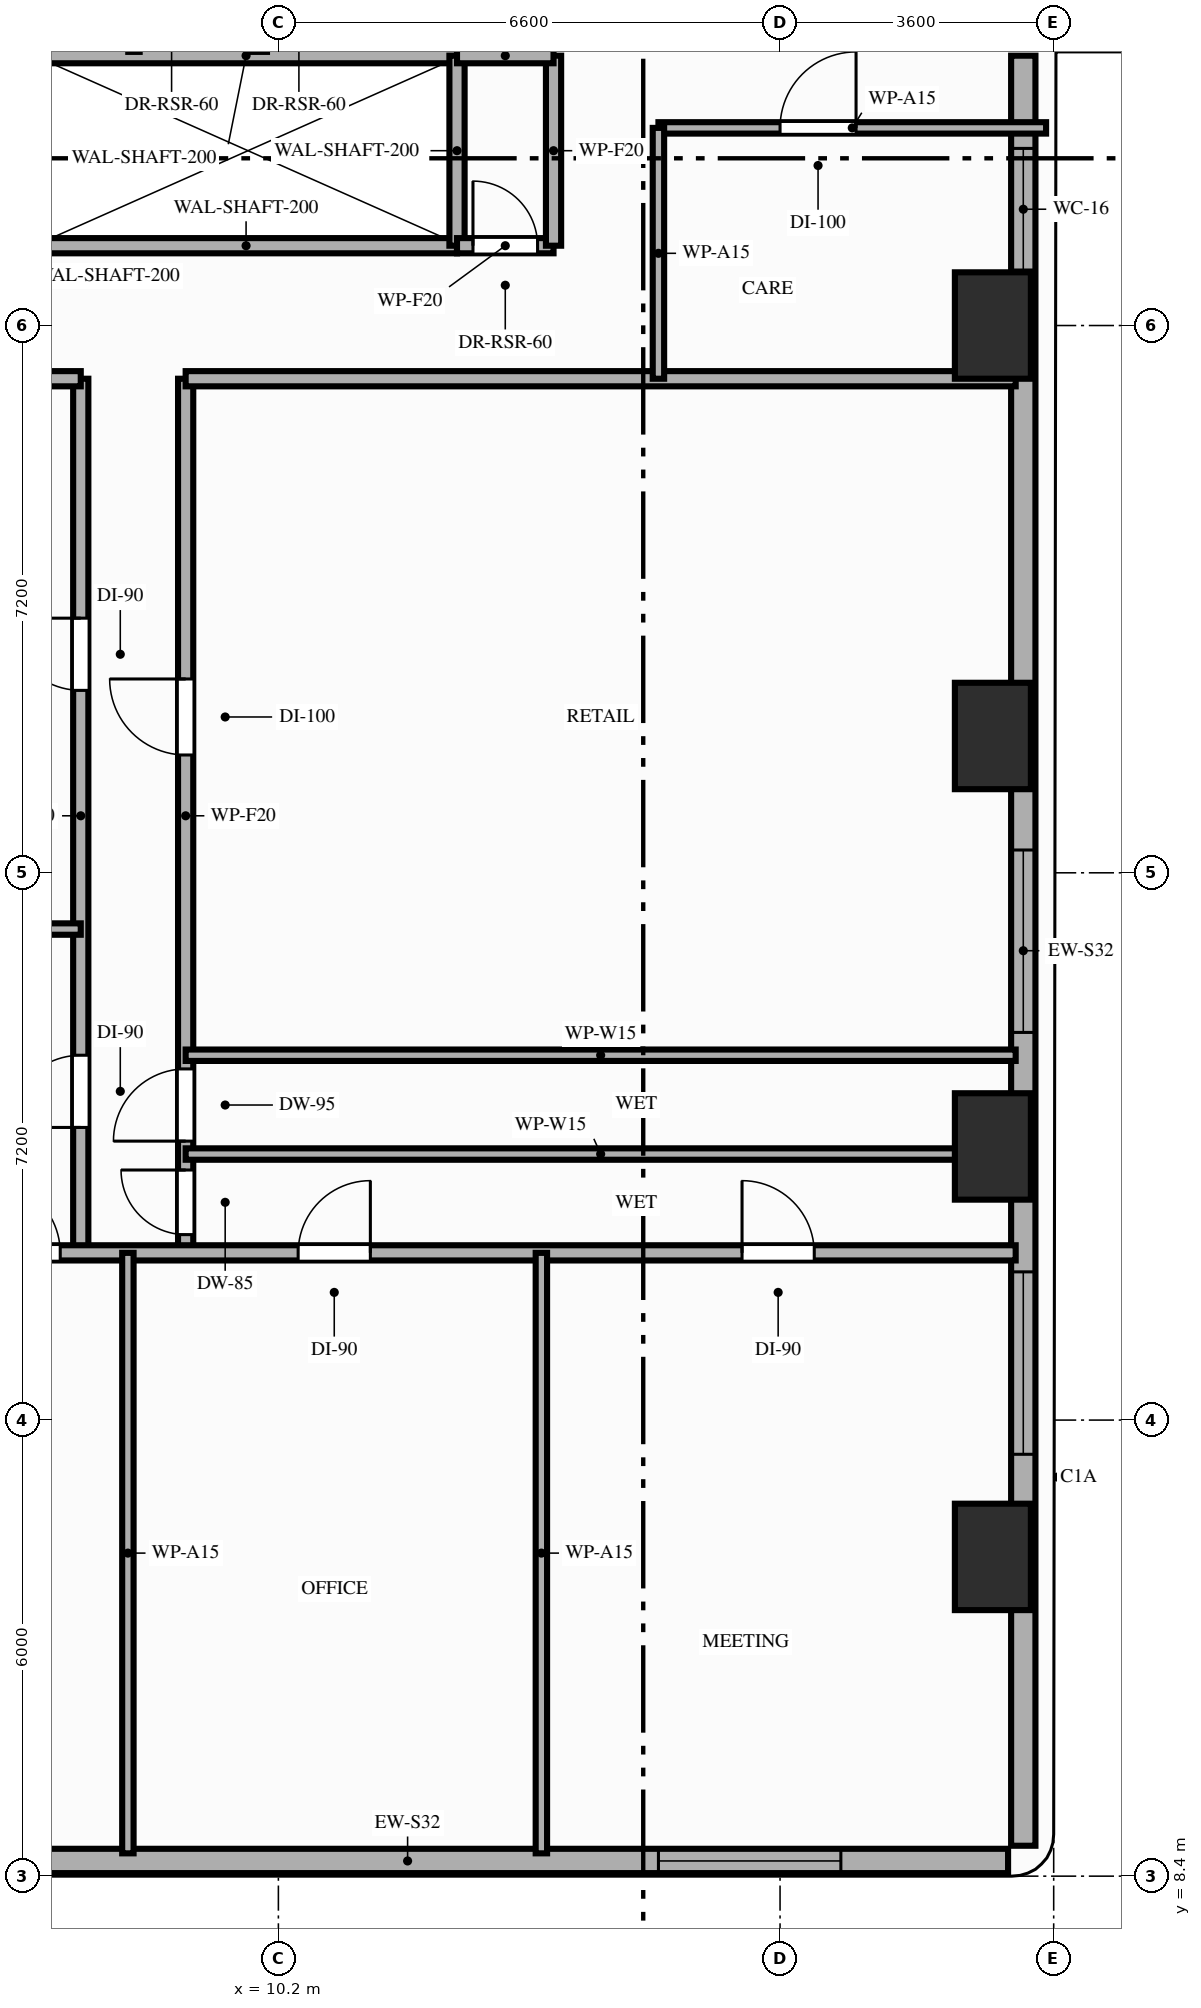
"""IFC4 building model, lengths in metres.
Left out: names, types, materials, properties, quantities, classifications, styles, units other than length and angle.
Written with IfcOpenShell. Run it as: python <this file> out.ifc"""

import sys

from ifc_helpers import new_model, si_unit, direction, frame, frame_2d, origin, origin_2d, place, context, subcontext, project, spatial, rectangle, extrude, element, fill, save


model = new_model("IFC4")
c1 = context("Model", 3, precision=1e-05, world=origin(), true_north=direction((0.0, 1.0)))
c2 = subcontext(c1, "Body", "Model", "MODEL_VIEW")
j1 = project(units=[si_unit("LENGTHUNIT", "METRE"), si_unit("PLANEANGLEUNIT", "RADIAN")], contexts=[c1])
p1 = place(None, origin())
s1 = spatial("IfcSite", under=j1, at=p1, CompositionType="ELEMENT")
p2 = place(p1, origin())
s2 = spatial("IfcBuilding", under=s1, at=p2, CompositionType="ELEMENT")
p3 = place(p2, frame((0.0, 0.0, 33.4)))
s3 = spatial("IfcBuildingStorey", under=s2, at=p3, CompositionType="ELEMENT", Elevation=33.4)
for number, where, z_axis, x_axis in (
    (1, (19.6, 12.6, 0.0), (0.0, 0.0, 1.0), (1.0, 0.0, 0.0)),
    (2, (19.6, 18.0, 0.0), (0.0, 0.0, 1.0), (1.0, 0.0, 0.0)),
    (3, (19.6, 23.4, 0.0), (0.0, 0.0, 1.0), (1.0, 0.0, 0.0)),
    (4, (19.6, 28.8, 0.0), (0.0, 0.0, 1.0), (1.0, 0.0, 0.0)),
):
    element("IfcColumn", number, at=place(p3, frame(where, z_axis=z_axis, x_axis=x_axis)), inside=s3, PredefinedType="COLUMN", context=c2, shape_type="SweptSolid", body=[
        extrude(rectangle(XDim=1.0, YDim=1.4, at=origin_2d()), origin(), (0.0, 0.0, 1.0), 3.2),
    ])
p4 = place(p3, frame((4.0, 8.6, 0.0), z_axis=(0.0, 0.0, 1.0), x_axis=(1.0, 0.0, 0.0)))
e5 = element("IfcWall", 5, at=p4, inside=s3, PredefinedType="STANDARD", context=c2, shape_type="SweptSolid", body=[
    extrude(rectangle(XDim=15.8, YDim=0.32, at=frame_2d((7.9, 0.0))), origin(), (0.0, 0.0, 1.0), 3.02),
])
p5 = place(p4, frame((11.2, 0.0, 0.85)))
e6 = element("IfcOpeningElement", 6, at=p5, cuts=e5, PredefinedType="OPENING", context=c2, shape_type="SweptSolid", body=[
    extrude(rectangle(XDim=2.4, YDim=1.8, at=frame_2d((1.2, 0.9))), frame((0.0, 0.17, 0.0), z_axis=(0.0, -1.0, 0.0), x_axis=(1.0, 0.0, 0.0)), (0.0, 0.0, 1.0), 0.34),
])
p6 = place(p3, frame((20.0, 8.8, 0.0), z_axis=(0.0, 0.0, 1.0), x_axis=(0.0, 1.0, 0.0)))
e7 = element("IfcWall", 7, at=p6, inside=s3, PredefinedType="STANDARD", context=c2, shape_type="SweptSolid", body=[
    extrude(rectangle(XDim=23.55, YDim=0.32, at=frame_2d((11.775, 0.0))), origin(), (0.0, 0.0, 1.0), 2.4),
])
p7 = place(p6, frame((20.73, 0.0, 0.85)))
e8 = element("IfcOpeningElement", 8, at=p7, cuts=e7, PredefinedType="OPENING", context=c2, shape_type="SweptSolid", body=[
    extrude(rectangle(XDim=1.6, YDim=1.3, at=frame_2d((0.8, 0.65))), frame((0.0, 0.17, 0.0), z_axis=(0.0, -1.0, 0.0), x_axis=(1.0, 0.0, 0.0)), (0.0, 0.0, 1.0), 0.34),
])
p8 = place(p6, frame((5.15, 0.0, 0.85)))
e9 = element("IfcOpeningElement", 9, at=p8, cuts=e7, PredefinedType="OPENING", context=c2, shape_type="SweptSolid", body=[
    extrude(rectangle(XDim=2.4, YDim=1.3, at=frame_2d((1.2, 0.65))), frame((0.0, 0.17, 0.0), z_axis=(0.0, -1.0, 0.0), x_axis=(1.0, 0.0, 0.0)), (0.0, 0.0, 1.0), 0.34),
])
p9 = place(p6, frame((10.7, 0.0, 0.85)))
e10 = element("IfcOpeningElement", 10, at=p9, cuts=e7, PredefinedType="OPENING", context=c2, shape_type="SweptSolid", body=[
    extrude(rectangle(XDim=2.4, YDim=1.3, at=frame_2d((1.2, 0.65))), frame((0.0, 0.17, 0.0), z_axis=(0.0, -1.0, 0.0), x_axis=(1.0, 0.0, 0.0)), (0.0, 0.0, 1.0), 0.34),
])
for number, where, z_axis, x_axis in (
    (11, (7.0, 29.85, 0.0), (0.0, 0.0, 1.0), (1.0, 0.0, 0.0)),
    (12, (7.0, 32.35, 0.0), (0.0, 0.0, 1.0), (1.0, 0.0, 0.0)),
):
    element("IfcWall", number, at=place(p3, frame(where, z_axis=z_axis, x_axis=x_axis)), inside=s3, PredefinedType="MOVABLE", context=c2, shape_type="SweptSolid", body=[
        extrude(rectangle(XDim=5.55, YDim=0.2, at=frame_2d((2.775, 0.0))), origin(), (0.0, 0.0, 1.0), 3.02),
    ])
p10 = place(p3, frame((12.55, 29.85, 0.0), z_axis=(0.0, 0.0, 1.0), x_axis=(0.0, 1.0, 0.0)))
e13 = element("IfcWall", 13, at=p10, inside=s3, PredefinedType="MOVABLE", context=c2, shape_type="SweptSolid", body=[
    extrude(rectangle(XDim=2.5, YDim=0.2, at=frame_2d((1.25, 0.0))), origin(), (0.0, 0.0, 1.0), 3.02),
])
p11 = place(p3, frame((12.55, 29.85, 0.0), z_axis=(0.0, 0.0, 1.0), x_axis=(1.0, 0.0, 0.0)))
e14 = element("IfcWall", 14, at=p11, inside=s3, PredefinedType="PARTITIONING", context=c2, shape_type="SweptSolid", body=[
    extrude(rectangle(XDim=1.27, YDim=0.2, at=frame_2d((0.635, 0.0))), origin(), (0.0, 0.0, 1.0), 3.02),
])
p12 = place(p11, frame((0.21, 0.0, 0.0)))
e15 = element("IfcOpeningElement", 15, at=p12, cuts=e14, PredefinedType="OPENING", context=c2, shape_type="SweptSolid", body=[
    extrude(rectangle(XDim=0.85, YDim=2.05, at=frame_2d((0.425, 1.025))), frame((0.0, 0.11, 0.0), z_axis=(0.0, -1.0, 0.0), x_axis=(1.0, 0.0, 0.0)), (0.0, 0.0, 1.0), 0.22),
])
p13 = place(p3, frame((13.82, 29.85, 0.0), z_axis=(0.0, 0.0, 1.0), x_axis=(0.0, 1.0, 0.0)))
e16 = element("IfcWall", 16, at=p13, inside=s3, PredefinedType="PARTITIONING", context=c2, shape_type="SweptSolid", body=[
    extrude(rectangle(XDim=2.5, YDim=0.2, at=frame_2d((1.25, 0.0))), origin(), (0.0, 0.0, 1.0), 3.02),
])
p14 = place(p3, frame((12.55, 32.35, 0.0), z_axis=(0.0, 0.0, 1.0), x_axis=(1.0, 0.0, 0.0)))
e17 = element("IfcWall", 17, at=p14, inside=s3, PredefinedType="PARTITIONING", context=c2, shape_type="SweptSolid", body=[
    extrude(rectangle(XDim=1.27, YDim=0.2, at=frame_2d((0.635, 0.0))), origin(), (0.0, 0.0, 1.0), 3.02),
])
p15 = place(p3, frame((7.6, 16.6, 0.0), z_axis=(0.0, 0.0, 1.0), x_axis=(0.0, 1.0, 0.0)))
e18 = element("IfcWall", 18, at=p15, inside=s3, PredefinedType="PARTITIONING", context=c2, shape_type="SweptSolid", body=[
    extrude(rectangle(XDim=11.5, YDim=0.2, at=frame_2d((5.75, 0.0))), origin(), (0.0, 0.0, 1.0), 2.4),
])
p16 = place(p15, frame((1.65, 0.0, 0.0)))
e19 = element("IfcOpeningElement", 19, at=p16, cuts=e18, PredefinedType="OPENING", context=c2, shape_type="SweptSolid", body=[
    extrude(rectangle(XDim=0.95, YDim=2.15, at=frame_2d((0.475, 1.075))), frame((0.0, 0.11, 0.0), z_axis=(0.0, -1.0, 0.0), x_axis=(1.0, 0.0, 0.0)), (0.0, 0.0, 1.0), 0.22),
])
p17 = place(p15, frame((7.4, 0.0, 0.0)))
e20 = element("IfcOpeningElement", 20, at=p17, cuts=e18, PredefinedType="OPENING", context=c2, shape_type="SweptSolid", body=[
    extrude(rectangle(XDim=0.95, YDim=2.15, at=frame_2d((0.475, 1.075))), frame((0.0, 0.11, 0.0), z_axis=(0.0, -1.0, 0.0), x_axis=(1.0, 0.0, 0.0)), (0.0, 0.0, 1.0), 0.22),
])
p18 = place(p3, frame((8.98, 16.6, 0.0), z_axis=(0.0, 0.0, 1.0), x_axis=(0.0, 1.0, 0.0)))
e21 = element("IfcWall", 21, at=p18, inside=s3, PredefinedType="PARTITIONING", context=c2, shape_type="SweptSolid", body=[
    extrude(rectangle(XDim=11.5, YDim=0.2, at=frame_2d((5.75, 0.0))), origin(), (0.0, 0.0, 1.0), 2.4),
])
p19 = place(p18, frame((0.24, 0.0, 0.0)))
e22 = element("IfcOpeningElement", 22, at=p19, cuts=e21, PredefinedType="OPENING", context=c2, shape_type="SweptSolid", body=[
    extrude(rectangle(XDim=0.85, YDim=2.1, at=frame_2d((0.425, 1.05))), frame((0.0, 0.11, 0.0), z_axis=(0.0, -1.0, 0.0), x_axis=(1.0, 0.0, 0.0)), (0.0, 0.0, 1.0), 0.22),
])
p20 = place(p18, frame((1.47, 0.0, 0.0)))
e23 = element("IfcOpeningElement", 23, at=p20, cuts=e21, PredefinedType="OPENING", context=c2, shape_type="SweptSolid", body=[
    extrude(rectangle(XDim=0.95, YDim=2.1, at=frame_2d((0.475, 1.05))), frame((0.0, 0.11, 0.0), z_axis=(0.0, -1.0, 0.0), x_axis=(1.0, 0.0, 0.0)), (0.0, 0.0, 1.0), 0.22),
])
p21 = place(p18, frame((6.55, 0.0, 0.0)))
e24 = element("IfcOpeningElement", 24, at=p21, cuts=e21, PredefinedType="OPENING", context=c2, shape_type="SweptSolid", body=[
    extrude(rectangle(XDim=1.0, YDim=2.15, at=frame_2d((0.5, 1.075))), frame((0.0, 0.11, 0.0), z_axis=(0.0, -1.0, 0.0), x_axis=(1.0, 0.0, 0.0)), (0.0, 0.0, 1.0), 0.22),
])
p22 = place(p3, frame((3.9, 16.6, 0.0), z_axis=(0.0, 0.0, 1.0), x_axis=(1.0, 0.0, 0.0)))
e25 = element("IfcWall", 25, at=p22, inside=s3, PredefinedType="PARTITIONING", context=c2, shape_type="SweptSolid", body=[
    extrude(rectangle(XDim=16.0, YDim=0.2, at=frame_2d((8.0, 0.0))), origin(), (0.0, 0.0, 1.0), 2.4),
])
p23 = place(p22, frame((2.48, 0.0, 0.0)))
e26 = element("IfcOpeningElement", 26, at=p23, cuts=e25, PredefinedType="OPENING", context=c2, shape_type="SweptSolid", body=[
    extrude(rectangle(XDim=0.95, YDim=2.15, at=frame_2d((0.475, 1.075))), frame((0.0, 0.11, 0.0), z_axis=(0.0, -1.0, 0.0), x_axis=(1.0, 0.0, 0.0)), (0.0, 0.0, 1.0), 0.22),
])
p24 = place(p22, frame((6.56, 0.0, 0.0)))
e27 = element("IfcOpeningElement", 27, at=p24, cuts=e25, PredefinedType="OPENING", context=c2, shape_type="SweptSolid", body=[
    extrude(rectangle(XDim=0.95, YDim=2.15, at=frame_2d((0.475, 1.075))), frame((0.0, 0.11, 0.0), z_axis=(0.0, -1.0, 0.0), x_axis=(1.0, 0.0, 0.0)), (0.0, 0.0, 1.0), 0.22),
])
p25 = place(p22, frame((12.4, 0.0, 0.0)))
e28 = element("IfcOpeningElement", 28, at=p25, cuts=e25, PredefinedType="OPENING", context=c2, shape_type="SweptSolid", body=[
    extrude(rectangle(XDim=0.95, YDim=2.15, at=frame_2d((0.475, 1.075))), frame((0.0, 0.11, 0.0), z_axis=(0.0, -1.0, 0.0), x_axis=(1.0, 0.0, 0.0)), (0.0, 0.0, 1.0), 0.22),
])
p26 = place(p3, frame((6.0, 28.1, 0.0), z_axis=(0.0, 0.0, 1.0), x_axis=(1.0, 0.0, 0.0)))
e29 = element("IfcWall", 29, at=p26, inside=s3, PredefinedType="PARTITIONING", context=c2, shape_type="SweptSolid", body=[
    extrude(rectangle(XDim=1.6, YDim=0.2, at=frame_2d((0.8, 0.0))), origin(), (0.0, 0.0, 1.0), 3.02),
])
p27 = place(p3, frame((8.98, 28.1, 0.0), z_axis=(0.0, 0.0, 1.0), x_axis=(1.0, 0.0, 0.0)))
e30 = element("IfcWall", 30, at=p27, inside=s3, PredefinedType="PARTITIONING", context=c2, shape_type="SweptSolid", body=[
    extrude(rectangle(XDim=10.92, YDim=0.2, at=frame_2d((5.46, 0.0))), origin(), (0.0, 0.0, 1.0), 2.4),
])
p28 = place(p3, frame((15.2, 31.4, 0.0), z_axis=(0.0, 0.0, 1.0), x_axis=(1.0, 0.0, 0.0)))
e31 = element("IfcWall", 31, at=p28, inside=s3, PredefinedType="PARTITIONING", context=c2, shape_type="SweptSolid", body=[
    extrude(rectangle(XDim=5.1, YDim=0.15, at=frame_2d((2.55, 0.0))), origin(), (0.0, 0.0, 1.0), 2.4),
])
p29 = place(p28, frame((1.6, 0.0, 0.0)))
e32 = element("IfcOpeningElement", 32, at=p29, cuts=e31, PredefinedType="OPENING", context=c2, shape_type="SweptSolid", body=[
    extrude(rectangle(XDim=1.0, YDim=2.15, at=frame_2d((0.5, 1.075))), frame((0.0, 0.085, 0.0), z_axis=(0.0, -1.0, 0.0), x_axis=(1.0, 0.0, 0.0)), (0.0, 0.0, 1.0), 0.17),
])
p30 = place(p3, frame((15.2, 28.1, 0.0), z_axis=(0.0, 0.0, 1.0), x_axis=(0.0, 1.0, 0.0)))
e33 = element("IfcWall", 33, at=p30, inside=s3, PredefinedType="PARTITIONING", context=c2, shape_type="SweptSolid", body=[
    extrude(rectangle(XDim=3.3, YDim=0.15, at=frame_2d((1.65, 0.0))), origin(), (0.0, 0.0, 1.0), 2.4),
])
p31 = place(p3, frame((3.9, 20.86, 0.0), z_axis=(0.0, 0.0, 1.0), x_axis=(1.0, 0.0, 0.0)))
e34 = element("IfcWall", 34, at=p31, inside=s3, PredefinedType="PARTITIONING", context=c2, shape_type="SweptSolid", body=[
    extrude(rectangle(XDim=3.7, YDim=0.15, at=frame_2d((1.85, 0.0))), origin(), (0.0, 0.0, 1.0), 2.4),
])
for number, where, z_axis, x_axis in (
    (35, (8.22, 8.7, 0.0), (0.0, 0.0, 1.0), (0.0, 1.0, 0.0)),
    (36, (13.66, 8.7, 0.0), (0.0, 0.0, 1.0), (0.0, 1.0, 0.0)),
):
    element("IfcWall", number, at=place(p3, frame(where, z_axis=z_axis, x_axis=x_axis)), inside=s3, PredefinedType="PARTITIONING", context=c2, shape_type="SweptSolid", body=[
        extrude(rectangle(XDim=7.9, YDim=0.15, at=frame_2d((3.95, 0.0))), origin(), (0.0, 0.0, 1.0), 2.4),
    ])
for number, where, z_axis, x_axis in (
    (37, (8.98, 17.9, 0.0), (0.0, 0.0, 1.0), (1.0, 0.0, 0.0)),
    (38, (8.98, 19.2, 0.0), (0.0, 0.0, 1.0), (1.0, 0.0, 0.0)),
):
    element("IfcWall", number, at=place(p3, frame(where, z_axis=z_axis, x_axis=x_axis)), inside=s3, PredefinedType="PARTITIONING", context=c2, shape_type="SweptSolid", body=[
        extrude(rectangle(XDim=10.92, YDim=0.15, at=frame_2d((5.46, 0.0))), origin(), (0.0, 0.0, 1.0), 2.4),
    ])
p32 = place(p7, origin())
e39 = element("IfcWindow", 39, at=p32, inside=s3, PartitioningType="SINGLE_PANEL", PredefinedType="WINDOW", context=c2, shape_type="SweptSolid", body=[
    extrude(rectangle(XDim=1.6, YDim=1.3, at=frame_2d((0.8, 0.65))), frame((0.0, 0.03, 0.0), z_axis=(0.0, -1.0, 0.0), x_axis=(1.0, 0.0, 0.0)), (0.0, 0.0, 1.0), 0.06),
])
fill(e8, e39)
p33 = place(p8, origin())
e40 = element("IfcWindow", 40, at=p33, inside=s3, PartitioningType="SINGLE_PANEL", PredefinedType="WINDOW", context=c2, shape_type="SweptSolid", body=[
    extrude(rectangle(XDim=2.4, YDim=1.3, at=frame_2d((1.2, 0.65))), frame((0.0, 0.03, 0.0), z_axis=(0.0, -1.0, 0.0), x_axis=(1.0, 0.0, 0.0)), (0.0, 0.0, 1.0), 0.06),
])
fill(e9, e40)
p34 = place(p9, origin())
e41 = element("IfcWindow", 41, at=p34, inside=s3, PartitioningType="SINGLE_PANEL", PredefinedType="WINDOW", context=c2, shape_type="SweptSolid", body=[
    extrude(rectangle(XDim=2.4, YDim=1.3, at=frame_2d((1.2, 0.65))), frame((0.0, 0.03, 0.0), z_axis=(0.0, -1.0, 0.0), x_axis=(1.0, 0.0, 0.0)), (0.0, 0.0, 1.0), 0.06),
])
fill(e10, e41)
p35 = place(p5, origin())
e42 = element("IfcWindow", 42, at=p35, inside=s3, PartitioningType="SINGLE_PANEL", PredefinedType="WINDOW", context=c2, shape_type="SweptSolid", body=[
    extrude(rectangle(XDim=2.4, YDim=1.8, at=frame_2d((1.2, 0.9))), frame((0.0, 0.03, 0.0), z_axis=(0.0, -1.0, 0.0), x_axis=(1.0, 0.0, 0.0)), (0.0, 0.0, 1.0), 0.06),
])
fill(e6, e42)
p36 = place(p12, origin())
e43 = element("IfcDoor", 43, at=p36, inside=s3, OperationType="SINGLE_SWING_LEFT", PredefinedType="DOOR", context=c2, shape_type="SweptSolid", body=[
    extrude(rectangle(XDim=0.85, YDim=2.05, at=frame_2d((0.425, 1.025))), frame((0.0, 0.025, 0.0), z_axis=(0.0, -1.0, 0.0), x_axis=(1.0, 0.0, 0.0)), (0.0, 0.0, 1.0), 0.05),
])
fill(e15, e43)
p37 = place(p29, origin())
e44 = element("IfcDoor", 44, at=p37, inside=s3, OperationType="SINGLE_SWING_RIGHT", PredefinedType="DOOR", context=c2, shape_type="SweptSolid", body=[
    extrude(rectangle(XDim=1.0, YDim=2.15, at=frame_2d((0.5, 1.075))), frame((0.0, 0.025, 0.0), z_axis=(0.0, -1.0, 0.0), x_axis=(1.0, 0.0, 0.0)), (0.0, 0.0, 1.0), 0.05),
])
fill(e32, e44)
p38 = place(p16, origin())
e45 = element("IfcDoor", 45, at=p38, inside=s3, OperationType="SINGLE_SWING_LEFT", PredefinedType="DOOR", context=c2, shape_type="SweptSolid", body=[
    extrude(rectangle(XDim=0.95, YDim=2.15, at=frame_2d((0.475, 1.075))), frame((0.0, 0.025, 0.0), z_axis=(0.0, -1.0, 0.0), x_axis=(1.0, 0.0, 0.0)), (0.0, 0.0, 1.0), 0.05),
])
fill(e19, e45)
p39 = place(p17, origin())
e46 = element("IfcDoor", 46, at=p39, inside=s3, OperationType="SINGLE_SWING_RIGHT", PredefinedType="DOOR", context=c2, shape_type="SweptSolid", body=[
    extrude(rectangle(XDim=0.95, YDim=2.15, at=frame_2d((0.475, 1.075))), frame((0.0, 0.025, 0.0), z_axis=(0.0, -1.0, 0.0), x_axis=(1.0, 0.0, 0.0)), (0.0, 0.0, 1.0), 0.05),
])
fill(e20, e46)
p40 = place(p23, origin())
e47 = element("IfcDoor", 47, at=p40, inside=s3, OperationType="SINGLE_SWING_LEFT", PredefinedType="DOOR", context=c2, shape_type="SweptSolid", body=[
    extrude(rectangle(XDim=0.95, YDim=2.15, at=frame_2d((0.475, 1.075))), frame((0.0, 0.025, 0.0), z_axis=(0.0, -1.0, 0.0), x_axis=(1.0, 0.0, 0.0)), (0.0, 0.0, 1.0), 0.05),
])
fill(e26, e47)
p41 = place(p24, origin())
e48 = element("IfcDoor", 48, at=p41, inside=s3, OperationType="SINGLE_SWING_RIGHT", PredefinedType="DOOR", context=c2, shape_type="SweptSolid", body=[
    extrude(rectangle(XDim=0.95, YDim=2.15, at=frame_2d((0.475, 1.075))), frame((0.0, 0.025, 0.0), z_axis=(0.0, -1.0, 0.0), x_axis=(1.0, 0.0, 0.0)), (0.0, 0.0, 1.0), 0.05),
])
fill(e27, e48)
p42 = place(p25, origin())
e49 = element("IfcDoor", 49, at=p42, inside=s3, OperationType="SINGLE_SWING_LEFT", PredefinedType="DOOR", context=c2, shape_type="SweptSolid", body=[
    extrude(rectangle(XDim=0.95, YDim=2.15, at=frame_2d((0.475, 1.075))), frame((0.0, 0.025, 0.0), z_axis=(0.0, -1.0, 0.0), x_axis=(1.0, 0.0, 0.0)), (0.0, 0.0, 1.0), 0.05),
])
fill(e28, e49)
p43 = place(p19, origin())
e50 = element("IfcDoor", 50, at=p43, inside=s3, OperationType="SINGLE_SWING_RIGHT", PredefinedType="DOOR", context=c2, shape_type="SweptSolid", body=[
    extrude(rectangle(XDim=0.85, YDim=2.1, at=frame_2d((0.425, 1.05))), frame((0.0, 0.025, 0.0), z_axis=(0.0, -1.0, 0.0), x_axis=(1.0, 0.0, 0.0)), (0.0, 0.0, 1.0), 0.05),
])
fill(e22, e50)
p44 = place(p20, origin())
e51 = element("IfcDoor", 51, at=p44, inside=s3, OperationType="SINGLE_SWING_LEFT", PredefinedType="DOOR", context=c2, shape_type="SweptSolid", body=[
    extrude(rectangle(XDim=0.95, YDim=2.1, at=frame_2d((0.475, 1.05))), frame((0.0, 0.025, 0.0), z_axis=(0.0, -1.0, 0.0), x_axis=(1.0, 0.0, 0.0)), (0.0, 0.0, 1.0), 0.05),
])
fill(e23, e51)
p45 = place(p21, origin())
e52 = element("IfcDoor", 52, at=p45, inside=s3, OperationType="SINGLE_SWING_RIGHT", PredefinedType="DOOR", context=c2, shape_type="SweptSolid", body=[
    extrude(rectangle(XDim=1.0, YDim=2.15, at=frame_2d((0.5, 1.075))), frame((0.0, 0.025, 0.0), z_axis=(0.0, -1.0, 0.0), x_axis=(1.0, 0.0, 0.0)), (0.0, 0.0, 1.0), 0.05),
])
fill(e24, e52)
save(model, sys.argv[1])
